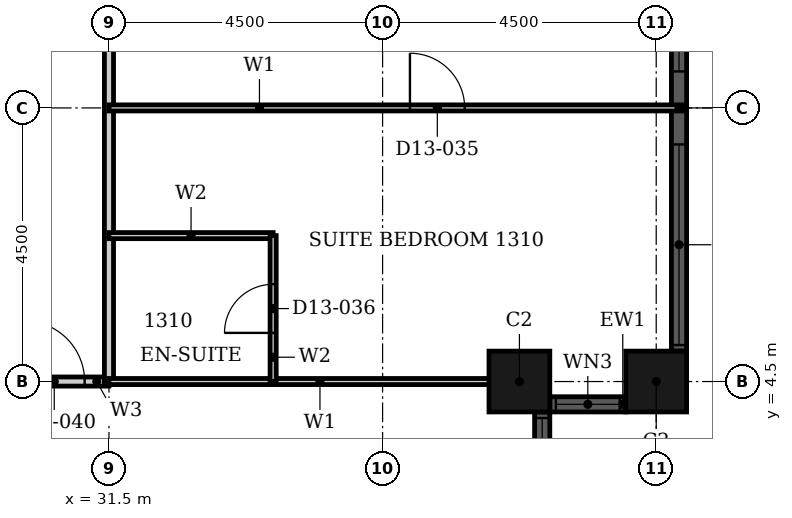
"""IFC4 building model, lengths in metres.
Left out: names, types, materials, properties, quantities, classifications, styles, units other than length and angle.
Written with IfcOpenShell. Run it as: python <this file> out.ifc"""

import sys

from ifc_helpers import new_model, si_unit, direction, frame, frame_2d, origin, origin_2d, place, context, subcontext, project, spatial, rectangle, hollow_rectangle, extrude, element, fill, save


model = new_model("IFC4")
c1 = context("Model", 3, precision=1e-05, world=origin(), true_north=direction((0.0, 1.0)))
c2 = subcontext(c1, "Body", "Model", "MODEL_VIEW")
j1 = project(units=[si_unit("LENGTHUNIT", "METRE"), si_unit("PLANEANGLEUNIT", "RADIAN")], contexts=[c1])
p1 = place(None, origin())
s1 = spatial("IfcSite", under=j1, at=p1, CompositionType="ELEMENT")
p2 = place(p1, origin())
s2 = spatial("IfcBuilding", under=s1, at=p2, CompositionType="ELEMENT")
p3 = place(p2, frame((0.0, 0.0, 60.0)))
s3 = spatial("IfcBuildingStorey", under=s2, at=p3, CompositionType="ELEMENT", Elevation=60.0)
for number, where, z_axis, x_axis in (
    (1, (38.25, 4.5, 0.0), (0.0, 0.0, 1.0), (1.0, 0.0, 0.0)),
    (2, (40.5, 4.5, 0.0), (0.0, 0.0, 1.0), (1.0, 0.0, 0.0)),
):
    element("IfcColumn", number, at=place(p3, frame(where, z_axis=z_axis, x_axis=x_axis)), inside=s3, PredefinedType="COLUMN", context=c2, shape_type="SweptSolid", body=[
        extrude(hollow_rectangle(XDim=1.0, YDim=1.0, WallThickness=0.032, at=origin_2d()), origin(), (0.0, 0.0, 1.0), 3.6),
    ])
p4 = place(p3, frame((38.625, 2.75, 0.0), z_axis=(0.0, 0.0, 1.0), x_axis=(0.0, 1.0, 0.0)))
e3 = element("IfcWall", 3, at=p4, inside=s3, PredefinedType="SOLIDWALL", context=c2, shape_type="SweptSolid", body=[
    extrude(rectangle(XDim=1.25, YDim=0.25, at=frame_2d((0.625, 0.0))), origin(), (0.0, 0.0, 1.0), 3.6),
])
p5 = place(p4, frame((0.1, 0.0, 0.9)))
e4 = element("IfcOpeningElement", 4, at=p5, cuts=e3, PredefinedType="OPENING", context=c2, shape_type="SweptSolid", body=[
    extrude(rectangle(XDim=1.05, YDim=2.08, at=frame_2d((0.525, 1.04))), frame((0.0, 0.135, 0.0), z_axis=(0.0, -1.0, 0.0), x_axis=(1.0, 0.0, 0.0)), (0.0, 0.0, 1.0), 0.27),
])
p6 = place(p3, frame((38.75, 4.125, 0.0), z_axis=(0.0, 0.0, 1.0), x_axis=(1.0, 0.0, 0.0)))
e5 = element("IfcWall", 5, at=p6, inside=s3, PredefinedType="SOLIDWALL", context=c2, shape_type="SweptSolid", body=[
    extrude(rectangle(XDim=1.25, YDim=0.25, at=frame_2d((0.625, 0.0))), origin(), (0.0, 0.0, 1.0), 3.6),
])
p7 = place(p6, frame((0.1, 0.0, 0.9)))
e6 = element("IfcOpeningElement", 6, at=p7, cuts=e5, PredefinedType="OPENING", context=c2, shape_type="SweptSolid", body=[
    extrude(rectangle(XDim=1.05, YDim=2.08, at=frame_2d((0.525, 1.04))), frame((0.0, 0.135, 0.0), z_axis=(0.0, -1.0, 0.0), x_axis=(1.0, 0.0, 0.0)), (0.0, 0.0, 1.0), 0.27),
])
p8 = place(p3, frame((40.875, 5.0, 0.0), z_axis=(0.0, 0.0, 1.0), x_axis=(0.0, 1.0, 0.0)))
e7 = element("IfcWall", 7, at=p8, inside=s3, PredefinedType="SOLIDWALL", context=c2, shape_type="SweptSolid", body=[
    extrude(rectangle(XDim=8.0, YDim=0.25, at=frame_2d((4.0, 0.0))), origin(), (0.0, 0.0, 1.0), 3.6),
])
p9 = place(p8, frame((0.1, 0.0, 0.9)))
e8 = element("IfcOpeningElement", 8, at=p9, cuts=e7, PredefinedType="OPENING", context=c2, shape_type="SweptSolid", body=[
    extrude(rectangle(XDim=3.3, YDim=2.08, at=frame_2d((1.65, 1.04))), frame((0.0, 0.135, 0.0), z_axis=(0.0, -1.0, 0.0), x_axis=(1.0, 0.0, 0.0)), (0.0, 0.0, 1.0), 0.27),
])
p10 = place(p8, frame((4.6, 0.0, 0.9)))
e9 = element("IfcOpeningElement", 9, at=p10, cuts=e7, PredefinedType="OPENING", context=c2, shape_type="SweptSolid", body=[
    extrude(rectangle(XDim=3.3, YDim=2.08, at=frame_2d((1.65, 1.04))), frame((0.0, 0.135, 0.0), z_axis=(0.0, -1.0, 0.0), x_axis=(1.0, 0.0, 0.0)), (0.0, 0.0, 1.0), 0.27),
])
p11 = place(p3, frame((29.7, 4.5, 0.0), z_axis=(0.0, 0.0, 1.0), x_axis=(1.0, 0.0, 0.0)))
e10 = element("IfcWall", 10, at=p11, inside=s3, PredefinedType="PARTITIONING", context=c2, shape_type="SweptSolid", body=[
    extrude(rectangle(XDim=1.8, YDim=0.15, at=frame_2d((0.9, 0.0))), origin(), (0.0, 0.0, 1.0), 3.3),
])
p12 = place(p11, frame((0.4, 0.0, 0.0)))
e11 = element("IfcOpeningElement", 11, at=p12, cuts=e10, PredefinedType="OPENING", context=c2, shape_type="SweptSolid", body=[
    extrude(rectangle(XDim=1.0, YDim=2.1, at=frame_2d((0.5, 1.05))), frame((0.0, 0.085, 0.0), z_axis=(0.0, -1.0, 0.0), x_axis=(1.0, 0.0, 0.0)), (0.0, 0.0, 1.0), 0.17),
])
p13 = place(p3, frame((31.5, 4.5, 0.0), z_axis=(0.0, 0.0, 1.0), x_axis=(0.0, 1.0, 0.0)))
e12 = element("IfcWall", 12, at=p13, inside=s3, PredefinedType="PARTITIONING", context=c2, shape_type="SweptSolid", body=[
    extrude(rectangle(XDim=16.2, YDim=0.15, at=frame_2d((8.1, 0.0))), origin(), (0.0, 0.0, 1.0), 2.58),
])
p14 = place(p13, frame((6.25, 0.0, 0.0)))
e13 = element("IfcOpeningElement", 13, at=p14, cuts=e12, PredefinedType="OPENING", context=c2, shape_type="SweptSolid", body=[
    extrude(rectangle(XDim=1.0, YDim=2.1, at=frame_2d((0.5, 1.05))), frame((0.0, 0.085, 0.0), z_axis=(0.0, -1.0, 0.0), x_axis=(1.0, 0.0, 0.0)), (0.0, 0.0, 1.0), 0.17),
])
p15 = place(p3, frame((31.5, 4.5, 0.0), z_axis=(0.0, 0.0, 1.0), x_axis=(1.0, 0.0, 0.0)))
e14 = element("IfcWall", 14, at=p15, inside=s3, PredefinedType="PARTITIONING", context=c2, shape_type="SweptSolid", body=[
    extrude(rectangle(XDim=6.94, YDim=0.1, at=frame_2d((3.47, 0.0))), origin(), (0.0, 0.0, 1.0), 3.3),
])
p16 = place(p3, frame((31.5, 9.0, 0.0), z_axis=(0.0, 0.0, 1.0), x_axis=(1.0, 0.0, 0.0)))
e15 = element("IfcWall", 15, at=p16, inside=s3, PredefinedType="PARTITIONING", context=c2, shape_type="SweptSolid", body=[
    extrude(rectangle(XDim=9.44, YDim=0.1, at=frame_2d((4.72, 0.0))), origin(), (0.0, 0.0, 1.0), 3.3),
])
p17 = place(p16, frame((4.95, 0.0, 0.0)))
e16 = element("IfcOpeningElement", 16, at=p17, cuts=e15, PredefinedType="OPENING", context=c2, shape_type="SweptSolid", body=[
    extrude(rectangle(XDim=0.9, YDim=2.1, at=frame_2d((0.45, 1.05))), frame((0.0, 0.06, 0.0), z_axis=(0.0, -1.0, 0.0), x_axis=(1.0, 0.0, 0.0)), (0.0, 0.0, 1.0), 0.12),
])
p18 = place(p3, frame((31.5, 6.9, 0.0), z_axis=(0.0, 0.0, 1.0), x_axis=(1.0, 0.0, 0.0)))
e17 = element("IfcWall", 17, at=p18, inside=s3, PredefinedType="PARTITIONING", context=c2, shape_type="SweptSolid", body=[
    extrude(rectangle(XDim=2.7, YDim=0.1, at=frame_2d((1.35, 0.0))), origin(), (0.0, 0.0, 1.0), 3.3),
])
p19 = place(p3, frame((34.2, 4.5, 0.0), z_axis=(0.0, 0.0, 1.0), x_axis=(0.0, 1.0, 0.0)))
e18 = element("IfcWall", 18, at=p19, inside=s3, PredefinedType="PARTITIONING", context=c2, shape_type="SweptSolid", body=[
    extrude(rectangle(XDim=2.4, YDim=0.1, at=frame_2d((1.2, 0.0))), origin(), (0.0, 0.0, 1.0), 3.3),
])
p20 = place(p19, frame((0.8, 0.0, 0.0)))
e19 = element("IfcOpeningElement", 19, at=p20, cuts=e18, PredefinedType="OPENING", context=c2, shape_type="SweptSolid", body=[
    extrude(rectangle(XDim=0.8, YDim=2.1, at=frame_2d((0.4, 1.05))), frame((0.0, 0.06, 0.0), z_axis=(0.0, -1.0, 0.0), x_axis=(1.0, 0.0, 0.0)), (0.0, 0.0, 1.0), 0.12),
])
p21 = place(p5, origin())
e20 = element("IfcWindow", 20, at=p21, inside=s3, PartitioningType="SINGLE_PANEL", PredefinedType="WINDOW", context=c2, shape_type="SweptSolid", body=[
    extrude(rectangle(XDim=1.05, YDim=2.08, at=frame_2d((0.525, 1.04))), frame((0.0, 0.03, 0.0), z_axis=(0.0, -1.0, 0.0), x_axis=(1.0, 0.0, 0.0)), (0.0, 0.0, 1.0), 0.06),
])
fill(e4, e20)
p22 = place(p7, origin())
e21 = element("IfcWindow", 21, at=p22, inside=s3, PartitioningType="SINGLE_PANEL", PredefinedType="WINDOW", context=c2, shape_type="SweptSolid", body=[
    extrude(rectangle(XDim=1.05, YDim=2.08, at=frame_2d((0.525, 1.04))), frame((0.0, 0.03, 0.0), z_axis=(0.0, -1.0, 0.0), x_axis=(1.0, 0.0, 0.0)), (0.0, 0.0, 1.0), 0.06),
])
fill(e6, e21)
p23 = place(p9, origin())
e22 = element("IfcWindow", 22, at=p23, inside=s3, PartitioningType="SINGLE_PANEL", PredefinedType="WINDOW", context=c2, shape_type="SweptSolid", body=[
    extrude(rectangle(XDim=3.3, YDim=2.08, at=frame_2d((1.65, 1.04))), frame((0.0, 0.03, 0.0), z_axis=(0.0, -1.0, 0.0), x_axis=(1.0, 0.0, 0.0)), (0.0, 0.0, 1.0), 0.06),
])
fill(e8, e22)
p24 = place(p10, origin())
e23 = element("IfcWindow", 23, at=p24, inside=s3, PartitioningType="SINGLE_PANEL", PredefinedType="WINDOW", context=c2, shape_type="SweptSolid", body=[
    extrude(rectangle(XDim=3.3, YDim=2.08, at=frame_2d((1.65, 1.04))), frame((0.0, 0.03, 0.0), z_axis=(0.0, -1.0, 0.0), x_axis=(1.0, 0.0, 0.0)), (0.0, 0.0, 1.0), 0.06),
])
fill(e9, e23)
p25 = place(p17, origin())
e24 = element("IfcDoor", 24, at=p25, inside=s3, OperationType="SINGLE_SWING_RIGHT", PredefinedType="DOOR", context=c2, shape_type="SweptSolid", body=[
    extrude(rectangle(XDim=0.9, YDim=2.1, at=frame_2d((0.45, 1.05))), frame((0.0, 0.025, 0.0), z_axis=(0.0, -1.0, 0.0), x_axis=(1.0, 0.0, 0.0)), (0.0, 0.0, 1.0), 0.05),
])
fill(e16, e24)
p26 = place(p20, origin())
e25 = element("IfcDoor", 25, at=p26, inside=s3, OperationType="SINGLE_SWING_LEFT", PredefinedType="DOOR", context=c2, shape_type="SweptSolid", body=[
    extrude(rectangle(XDim=0.8, YDim=2.1, at=frame_2d((0.4, 1.05))), frame((0.0, 0.025, 0.0), z_axis=(0.0, -1.0, 0.0), x_axis=(1.0, 0.0, 0.0)), (0.0, 0.0, 1.0), 0.05),
])
fill(e19, e25)
p27 = place(p12, origin())
e26 = element("IfcDoor", 26, at=p27, inside=s3, OperationType="SINGLE_SWING_LEFT", PredefinedType="DOOR", context=c2, shape_type="SweptSolid", body=[
    extrude(rectangle(XDim=1.0, YDim=2.1, at=frame_2d((0.5, 1.05))), frame((0.0, 0.025, 0.0), z_axis=(0.0, -1.0, 0.0), x_axis=(1.0, 0.0, 0.0)), (0.0, 0.0, 1.0), 0.05),
])
fill(e11, e26)
save(model, sys.argv[1])
